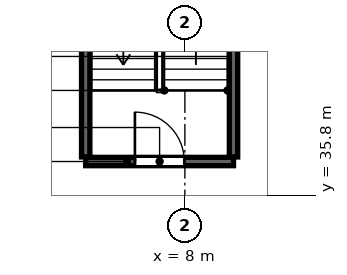
"""IFC4 building model, lengths in metres.
Left out: names, types, materials, properties, quantities, classifications, styles, units other than length and angle.
Written with IfcOpenShell. Run it as: python <this file> out.ifc"""

import sys

from ifc_helpers import new_model, si_unit, direction, frame, frame_2d, origin, place, context, subcontext, project, spatial, rectangle, extrude, source, transform, mapped, element, fill, save


model = new_model("IFC4")
c1 = context("Model", 3, precision=1e-05, world=origin(), true_north=direction((0.0, 1.0)))
c2 = subcontext(c1, "Body", "Model", "MODEL_VIEW")
j1 = project(units=[si_unit("LENGTHUNIT", "METRE"), si_unit("PLANEANGLEUNIT", "RADIAN")], contexts=[c1])
p1 = place(None, origin())
s1 = spatial("IfcSite", under=j1, at=p1, CompositionType="ELEMENT")
p2 = place(p1, origin())
s2 = spatial("IfcBuilding", under=s1, at=p2, CompositionType="ELEMENT")
p3 = place(p2, frame((0.0, 0.0, 6.0)))
s3 = spatial("IfcBuildingStorey", under=s2, at=p3, CompositionType="ELEMENT", Elevation=6.0)
m1 = source(origin(), c2, "Body", "SweptSolid", [
    extrude(rectangle(XDim=3.89, YDim=0.22, at=frame_2d((1.945, 0.0))), origin(), (0.0, 0.0, 1.0), 6.0),
])
p4 = place(p3, frame((5.39, 36.69, 0.0), z_axis=(0.0, 0.0, 1.0), x_axis=(1.0, 0.0, 0.0)))
e1 = element("IfcWall", 1, at=p4, inside=s3, PredefinedType="SOLIDWALL", context=c2, shape_type="MappedRepresentation", body=[
    mapped(m1, transform((0.0, 0.0, 0.0), scale=1.0)),
])
p5 = place(p4, frame((1.295, 0.0, 0.0)))
e2 = element("IfcOpeningElement", 2, at=p5, cuts=e1, PredefinedType="OPENING", context=c2, shape_type="SweptSolid", body=[
    extrude(rectangle(XDim=1.3, YDim=2.15, at=frame_2d((0.65, 1.075))), frame((0.0, 0.12, 0.0), z_axis=(0.0, -1.0, 0.0), x_axis=(1.0, 0.0, 0.0)), (0.0, 0.0, 1.0), 0.24),
])
m2 = source(origin(), c2, "Body", "SweptSolid", [
    extrude(rectangle(XDim=10.38, YDim=0.22, at=frame_2d((5.19, 0.0))), origin(), (0.0, 0.0, 1.0), 6.0),
])
for number, where, z_axis, x_axis in (
    (3, (5.39, 36.81, 0.0), (0.0, 0.0, 1.0), (0.0, 1.0, 0.0)),
    (4, (9.28, 36.81, 0.0), (0.0, 0.0, 1.0), (0.0, 1.0, 0.0)),
):
    element("IfcWall", number, at=place(p3, frame(where, z_axis=z_axis, x_axis=x_axis)), inside=s3, PredefinedType="SOLIDWALL", context=c2, shape_type="MappedRepresentation", body=[
        mapped(m2, transform((0.0, 0.0, 0.0), scale=1.0)),
    ])
m3 = source(origin(), c2, "Body", "SweptSolid", [
    extrude(rectangle(XDim=1.3, YDim=2.15, at=frame_2d((0.65, 1.075))), frame((0.0, 0.025, 0.0), z_axis=(0.0, -1.0, 0.0), x_axis=(1.0, 0.0, 0.0)), (0.0, 0.0, 1.0), 0.05),
])
p6 = place(p5, origin())
e5 = element("IfcDoor", 5, at=p6, inside=s3, OperationType="SINGLE_SWING_LEFT", PredefinedType="DOOR", context=c2, shape_type="MappedRepresentation", body=[
    mapped(m3, transform((0.0, 0.0, 0.0), scale=1.0)),
])
fill(e2, e5)
save(model, sys.argv[1])
